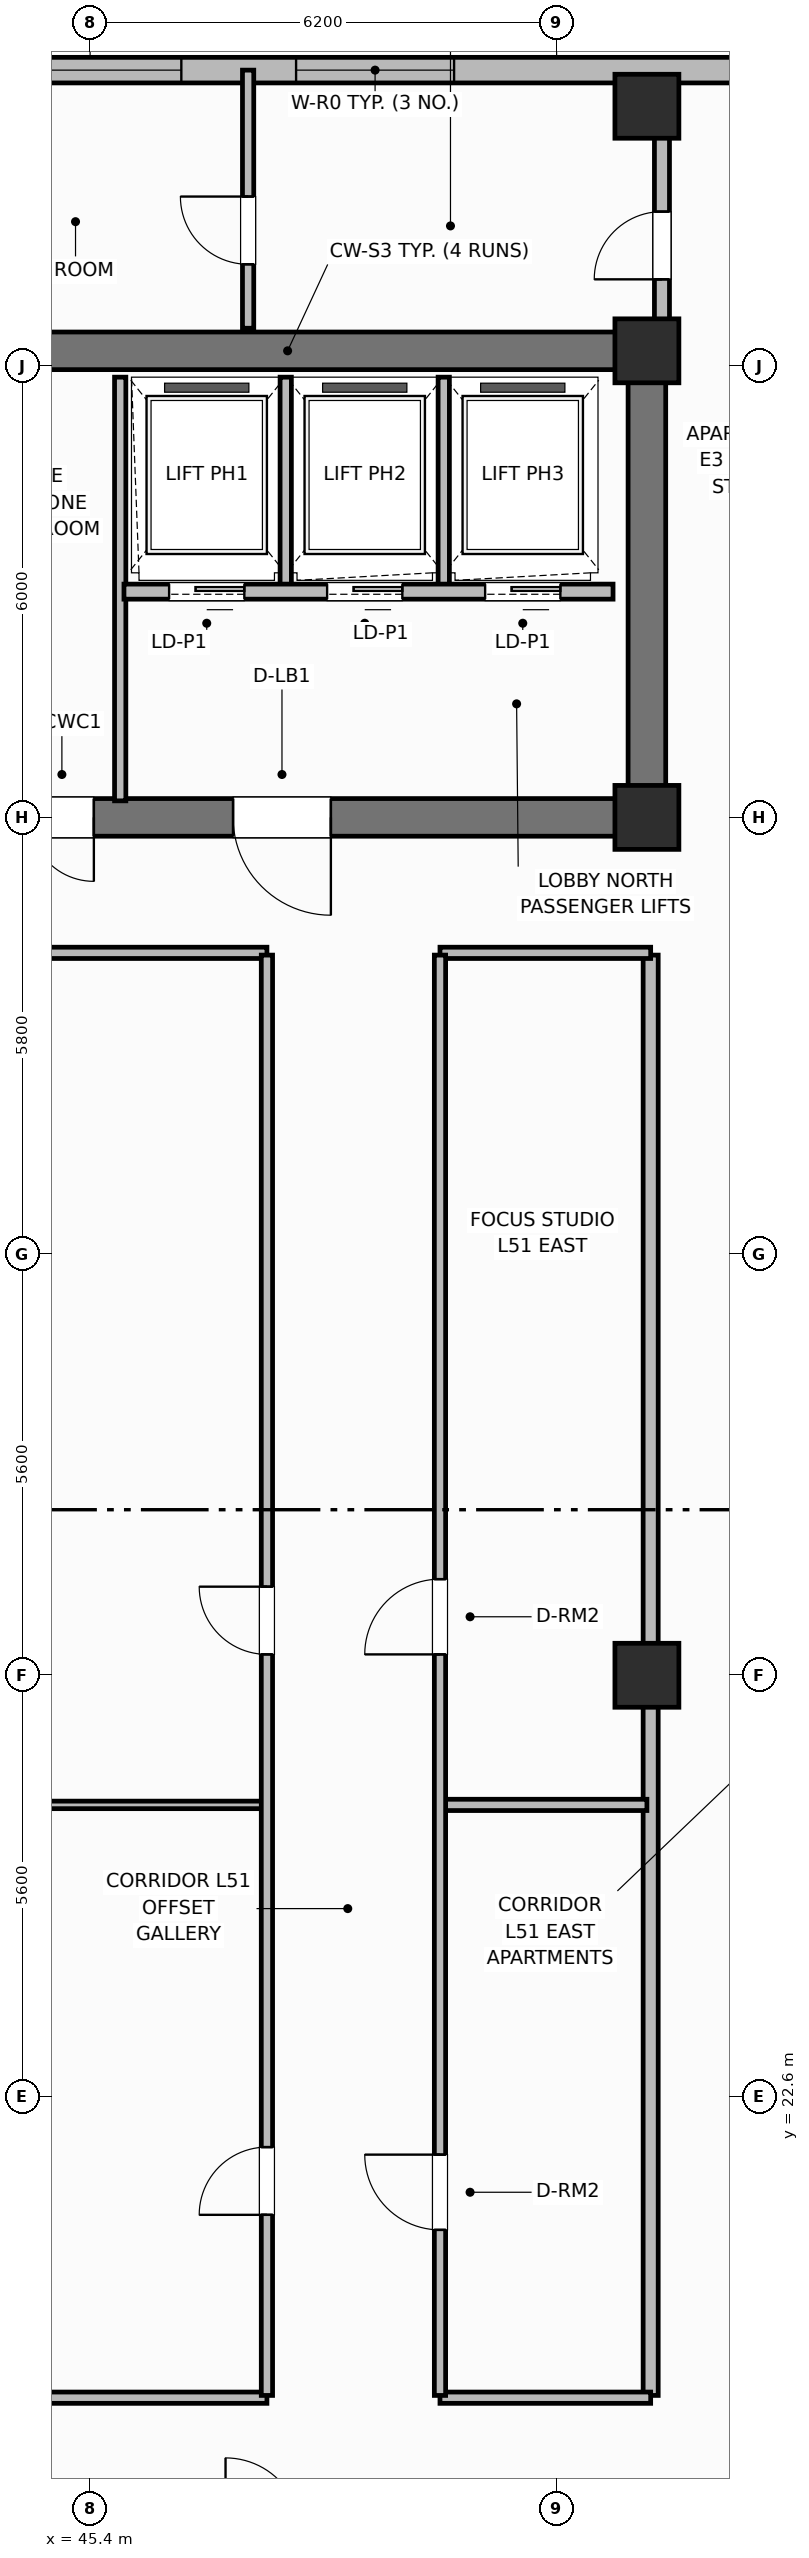
"""IFC4 building model, lengths in metres.
Left out: names, types, materials, properties, quantities, classifications, styles, units other than length and angle.
Written with IfcOpenShell. Run it as: python <this file> out.ifc"""

import sys

from ifc_helpers import new_model, si_unit, direction, frame, frame_2d, origin, origin_2d, place, context, subcontext, project, spatial, rectangle, extrude, element, fill, save


model = new_model("IFC4")
c1 = context("Model", 3, precision=1e-05, world=origin(), true_north=direction((0.0, 1.0)))
c2 = subcontext(c1, "Body", "Model", "MODEL_VIEW")
j1 = project(units=[si_unit("LENGTHUNIT", "METRE"), si_unit("PLANEANGLEUNIT", "RADIAN")], contexts=[c1])
p1 = place(None, origin())
s1 = spatial("IfcSite", under=j1, at=p1, CompositionType="ELEMENT")
p2 = place(p1, origin())
s2 = spatial("IfcBuilding", under=s1, at=p2, CompositionType="ELEMENT")
p3 = place(p2, frame((0.0, 0.0, 207.3)))
s3 = spatial("IfcBuildingStorey", under=s2, at=p3, CompositionType="ELEMENT", Elevation=207.3)
p4 = place(p3, frame((25.6, 45.8, 0.0), z_axis=(0.0, 0.0, 1.0), x_axis=(1.0, 0.0, 0.0)))
e1 = element("IfcWall", 1, at=p4, inside=s3, PredefinedType="SHEAR", context=c2, shape_type="SweptSolid", body=[
    extrude(rectangle(XDim=27.2, YDim=0.5, at=frame_2d((13.6, 0.0))), origin(), (0.0, 0.0, 1.0), 3.7),
])
p5 = place(p3, frame((52.8, 39.85, 0.0), z_axis=(0.0, 0.0, 1.0), x_axis=(0.0, 1.0, 0.0)))
e2 = element("IfcWall", 2, at=p5, inside=s3, PredefinedType="SHEAR", context=c2, shape_type="SweptSolid", body=[
    extrude(rectangle(XDim=5.7, YDim=0.5, at=frame_2d((2.85, 0.0))), origin(), (0.0, 0.0, 1.0), 3.7),
])
p6 = place(p3, frame((52.8, 39.6, 0.0), z_axis=(0.0, 0.0, 1.0), x_axis=(-1.0, 0.0, 0.0)))
e3 = element("IfcWall", 3, at=p6, inside=s3, PredefinedType="SHEAR", context=c2, shape_type="SweptSolid", body=[
    extrude(rectangle(XDim=27.2, YDim=0.5, at=frame_2d((13.6, 0.0))), origin(), (0.0, 0.0, 1.0), 3.7),
])
p7 = place(p6, frame((24.2, 0.0, 0.0)))
e4 = element("IfcOpeningElement", 4, at=p7, cuts=e3, PredefinedType="OPENING", context=c2, shape_type="SweptSolid", body=[
    extrude(rectangle(XDim=1.1, YDim=2.15, at=frame_2d((0.55, 1.075))), frame((0.0, 0.26, 0.0), z_axis=(0.0, -1.0, 0.0), x_axis=(1.0, 0.0, 0.0)), (0.0, 0.0, 1.0), 0.52),
])
p8 = place(p6, frame((15.1, 0.0, 0.0)))
e5 = element("IfcOpeningElement", 5, at=p8, cuts=e3, PredefinedType="OPENING", context=c2, shape_type="SweptSolid", body=[
    extrude(rectangle(XDim=1.2, YDim=2.15, at=frame_2d((0.6, 1.075))), frame((0.0, 0.26, 0.0), z_axis=(0.0, -1.0, 0.0), x_axis=(1.0, 0.0, 0.0)), (0.0, 0.0, 1.0), 0.52),
])
p9 = place(p6, frame((11.6, 0.0, 0.0)))
e6 = element("IfcOpeningElement", 6, at=p9, cuts=e3, PredefinedType="OPENING", context=c2, shape_type="SweptSolid", body=[
    extrude(rectangle(XDim=0.9, YDim=2.1, at=frame_2d((0.45, 1.05))), frame((0.0, 0.26, 0.0), z_axis=(0.0, -1.0, 0.0), x_axis=(1.0, 0.0, 0.0)), (0.0, 0.0, 1.0), 0.52),
])
p10 = place(p6, frame((7.35, 0.0, 0.0)))
e7 = element("IfcOpeningElement", 7, at=p10, cuts=e3, PredefinedType="OPENING", context=c2, shape_type="SweptSolid", body=[
    extrude(rectangle(XDim=0.85, YDim=2.1, at=frame_2d((0.425, 1.05))), frame((0.0, 0.26, 0.0), z_axis=(0.0, -1.0, 0.0), x_axis=(1.0, 0.0, 0.0)), (0.0, 0.0, 1.0), 0.52),
])
p11 = place(p6, frame((4.2, 0.0, 0.0)))
e8 = element("IfcOpeningElement", 8, at=p11, cuts=e3, PredefinedType="OPENING", context=c2, shape_type="SweptSolid", body=[
    extrude(rectangle(XDim=1.3, YDim=2.2, at=frame_2d((0.65, 1.1))), frame((0.0, 0.26, 0.0), z_axis=(0.0, -1.0, 0.0), x_axis=(1.0, 0.0, 0.0)), (0.0, 0.0, 1.0), 0.52),
])
for number, where, z_axis, x_axis in (
    (9, (52.8, 39.6, 0.0), (0.0, 0.0, 1.0), (1.0, 0.0, 0.0)),
    (10, (52.8, 45.8, 0.0), (0.0, 0.0, 1.0), (1.0, 0.0, 0.0)),
    (11, (52.8, 28.2, 0.0), (0.0, 0.0, 1.0), (1.0, 0.0, 0.0)),
    (12, (52.8, 49.05, 0.0), (0.0, 0.0, 1.0), (1.0, 0.0, 0.0)),
):
    element("IfcColumn", number, at=place(p3, frame(where, z_axis=z_axis, x_axis=x_axis)), inside=s3, PredefinedType="COLUMN", context=c2, shape_type="SweptSolid", body=[
        extrude(rectangle(XDim=0.85, YDim=0.85, at=origin_2d()), origin(), (0.0, 0.0, 1.0), 3.7),
    ])
p12 = place(p3, frame((58.2, 49.53, 0.0), z_axis=(0.0, 0.0, 1.0), x_axis=(-1.0, 0.0, 0.0)))
e13 = element("IfcWall", 13, at=p12, inside=s3, PredefinedType="SOLIDWALL", context=c2, shape_type="SweptSolid", body=[
    extrude(rectangle(XDim=15.8, YDim=0.34, at=frame_2d((7.9, 0.0))), origin(), (0.0, 0.0, 1.0), 2.72),
])
p13 = place(p12, frame((7.962, 0.0, 0.7)))
e14 = element("IfcOpeningElement", 14, at=p13, cuts=e13, PredefinedType="OPENING", context=c2, shape_type="SweptSolid", body=[
    extrude(rectangle(XDim=2.1, YDim=1.9, at=frame_2d((1.05, 0.95))), frame((0.0, 0.18, 0.0), z_axis=(0.0, -1.0, 0.0), x_axis=(1.0, 0.0, 0.0)), (0.0, 0.0, 1.0), 0.36),
])
p14 = place(p12, frame((11.587, 0.0, 0.7)))
e15 = element("IfcOpeningElement", 15, at=p14, cuts=e13, PredefinedType="OPENING", context=c2, shape_type="SweptSolid", body=[
    extrude(rectangle(XDim=2.1, YDim=1.9, at=frame_2d((1.05, 0.95))), frame((0.0, 0.18, 0.0), z_axis=(0.0, -1.0, 0.0), x_axis=(1.0, 0.0, 0.0)), (0.0, 0.0, 1.0), 0.36),
])
p15 = place(p3, frame((45.8, 39.82, 0.0), z_axis=(0.0, 0.0, 1.0), x_axis=(0.0, 1.0, 0.0)))
e16 = element("IfcWall", 16, at=p15, inside=s3, PredefinedType="PARTITIONING", context=c2, shape_type="SweptSolid", body=[
    extrude(rectangle(XDim=5.63, YDim=0.15, at=frame_2d((2.815, 0.0))), origin(), (0.0, 0.0, 1.0), 2.55),
])
for number, where, z_axis, x_axis in (
    (17, (48.0, 42.65, 0.0), (0.0, 0.0, 1.0), (0.0, 1.0, 0.0)),
    (18, (50.1, 42.65, 0.0), (0.0, 0.0, 1.0), (0.0, 1.0, 0.0)),
):
    element("IfcWall", number, at=place(p3, frame(where, z_axis=z_axis, x_axis=x_axis)), inside=s3, PredefinedType="PARTITIONING", context=c2, shape_type="SweptSolid", body=[
        extrude(rectangle(XDim=2.8, YDim=0.15, at=frame_2d((1.4, 0.0))), origin(), (0.0, 0.0, 1.0), 2.55),
    ])
p16 = place(p3, frame((52.35, 42.6, 0.0), z_axis=(0.0, 0.0, 1.0), x_axis=(-1.0, 0.0, 0.0)))
e19 = element("IfcWall", 19, at=p16, inside=s3, PredefinedType="PARTITIONING", context=c2, shape_type="SweptSolid", body=[
    extrude(rectangle(XDim=6.5, YDim=0.2, at=frame_2d((3.25, 0.0))), origin(), (0.0, 0.0, 1.0), 2.55),
])
p17 = place(p16, frame((4.9, 0.0, 0.0)))
e20 = element("IfcOpeningElement", 20, at=p17, cuts=e19, PredefinedType="OPENING", context=c2, shape_type="SweptSolid", body=[
    extrude(rectangle(XDim=1.0, YDim=2.15, at=frame_2d((0.5, 1.075))), frame((0.0, 0.11, 0.0), z_axis=(0.0, -1.0, 0.0), x_axis=(1.0, 0.0, 0.0)), (0.0, 0.0, 1.0), 0.22),
])
p18 = place(p16, frame((2.8, 0.0, 0.0)))
e21 = element("IfcOpeningElement", 21, at=p18, cuts=e19, PredefinedType="OPENING", context=c2, shape_type="SweptSolid", body=[
    extrude(rectangle(XDim=1.0, YDim=2.15, at=frame_2d((0.5, 1.075))), frame((0.0, 0.11, 0.0), z_axis=(0.0, -1.0, 0.0), x_axis=(1.0, 0.0, 0.0)), (0.0, 0.0, 1.0), 0.22),
])
p19 = place(p16, frame((0.7, 0.0, 0.0)))
e22 = element("IfcOpeningElement", 22, at=p19, cuts=e19, PredefinedType="OPENING", context=c2, shape_type="SweptSolid", body=[
    extrude(rectangle(XDim=1.0, YDim=2.15, at=frame_2d((0.5, 1.075))), frame((0.0, 0.11, 0.0), z_axis=(0.0, -1.0, 0.0), x_axis=(1.0, 0.0, 0.0)), (0.0, 0.0, 1.0), 0.22),
])
p20 = place(p3, frame((52.85, 18.63, 0.0), z_axis=(0.0, 0.0, 1.0), x_axis=(0.0, 1.0, 0.0)))
e23 = element("IfcWall", 23, at=p20, inside=s3, PredefinedType="PARTITIONING", context=c2, shape_type="SweptSolid", body=[
    extrude(rectangle(XDim=19.14, YDim=0.2, at=frame_2d((9.57, 0.0))), origin(), (0.0, 0.0, 1.0), 2.55),
])
p21 = place(p3, frame((25.55, 18.6, 0.0), z_axis=(0.0, 0.0, 1.0), x_axis=(1.0, 0.0, 0.0)))
e24 = element("IfcWall", 24, at=p21, inside=s3, PredefinedType="PARTITIONING", context=c2, shape_type="SweptSolid", body=[
    extrude(rectangle(XDim=22.2, YDim=0.15, at=frame_2d((11.1, 0.0))), origin(), (0.0, 0.0, 1.0), 2.55),
])
p22 = place(p3, frame((50.05, 18.6, 0.0), z_axis=(0.0, 0.0, 1.0), x_axis=(1.0, 0.0, 0.0)))
e25 = element("IfcWall", 25, at=p22, inside=s3, PredefinedType="PARTITIONING", context=c2, shape_type="SweptSolid", body=[
    extrude(rectangle(XDim=2.8, YDim=0.15, at=frame_2d((1.4, 0.0))), origin(), (0.0, 0.0, 1.0), 2.55),
])
p23 = place(p3, frame((25.55, 37.8, 0.0), z_axis=(0.0, 0.0, 1.0), x_axis=(1.0, 0.0, 0.0)))
e26 = element("IfcWall", 26, at=p23, inside=s3, PredefinedType="PARTITIONING", context=c2, shape_type="SweptSolid", body=[
    extrude(rectangle(XDim=22.2, YDim=0.15, at=frame_2d((11.1, 0.0))), origin(), (0.0, 0.0, 1.0), 2.55),
])
p24 = place(p3, frame((50.05, 37.8, 0.0), z_axis=(0.0, 0.0, 1.0), x_axis=(1.0, 0.0, 0.0)))
e27 = element("IfcWall", 27, at=p24, inside=s3, PredefinedType="PARTITIONING", context=c2, shape_type="SweptSolid", body=[
    extrude(rectangle(XDim=2.8, YDim=0.15, at=frame_2d((1.4, 0.0))), origin(), (0.0, 0.0, 1.0), 2.55),
])
p25 = place(p3, frame((34.95, 26.477, 0.0), z_axis=(0.0, 0.0, 1.0), x_axis=(1.0, 0.0, 0.0)))
e28 = element("IfcWall", 28, at=p25, inside=s3, PredefinedType="PARTITIONING", context=c2, shape_type="SweptSolid", body=[
    extrude(rectangle(XDim=12.81, YDim=0.1, at=frame_2d((6.405, 0.0))), origin(), (0.0, 0.0, 1.0), 2.55),
])
p26 = place(p3, frame((50.08, 26.477, 0.0), z_axis=(0.0, 0.0, 1.0), x_axis=(1.0, 0.0, 0.0)))
e29 = element("IfcWall", 29, at=p26, inside=s3, PredefinedType="PARTITIONING", context=c2, shape_type="SweptSolid", body=[
    extrude(rectangle(XDim=2.72, YDim=0.15, at=frame_2d((1.36, 0.0))), origin(), (0.0, 0.0, 1.0), 2.55),
])
p27 = place(p3, frame((47.75, 18.63, 0.0), z_axis=(0.0, 0.0, 1.0), x_axis=(0.0, 1.0, 0.0)))
e30 = element("IfcWall", 30, at=p27, inside=s3, PredefinedType="PARTITIONING", context=c2, shape_type="SweptSolid", body=[
    extrude(rectangle(XDim=19.14, YDim=0.15, at=frame_2d((9.57, 0.0))), origin(), (0.0, 0.0, 1.0), 2.55),
])
p28 = place(p27, frame((2.4, 0.0, 0.0)))
e31 = element("IfcOpeningElement", 31, at=p28, cuts=e30, PredefinedType="OPENING", context=c2, shape_type="SweptSolid", body=[
    extrude(rectangle(XDim=0.9, YDim=2.1, at=frame_2d((0.45, 1.05))), frame((0.0, 0.085, 0.0), z_axis=(0.0, -1.0, 0.0), x_axis=(1.0, 0.0, 0.0)), (0.0, 0.0, 1.0), 0.17),
])
p29 = place(p27, frame((9.847, 0.0, 0.0)))
e32 = element("IfcOpeningElement", 32, at=p29, cuts=e30, PredefinedType="OPENING", context=c2, shape_type="SweptSolid", body=[
    extrude(rectangle(XDim=0.9, YDim=2.1, at=frame_2d((0.45, 1.05))), frame((0.0, 0.085, 0.0), z_axis=(0.0, -1.0, 0.0), x_axis=(1.0, 0.0, 0.0)), (0.0, 0.0, 1.0), 0.17),
])
p30 = place(p3, frame((50.05, 18.63, 0.0), z_axis=(0.0, 0.0, 1.0), x_axis=(0.0, 1.0, 0.0)))
e33 = element("IfcWall", 33, at=p30, inside=s3, PredefinedType="PARTITIONING", context=c2, shape_type="SweptSolid", body=[
    extrude(rectangle(XDim=19.14, YDim=0.15, at=frame_2d((9.57, 0.0))), origin(), (0.0, 0.0, 1.0), 2.55),
])
p31 = place(p30, frame((2.2, 0.0, 0.0)))
e34 = element("IfcOpeningElement", 34, at=p31, cuts=e33, PredefinedType="OPENING", context=c2, shape_type="SweptSolid", body=[
    extrude(rectangle(XDim=1.0, YDim=2.15, at=frame_2d((0.5, 1.075))), frame((0.0, 0.085, 0.0), z_axis=(0.0, -1.0, 0.0), x_axis=(1.0, 0.0, 0.0)), (0.0, 0.0, 1.0), 0.17),
])
p32 = place(p30, frame((9.847, 0.0, 0.0)))
e35 = element("IfcOpeningElement", 35, at=p32, cuts=e33, PredefinedType="OPENING", context=c2, shape_type="SweptSolid", body=[
    extrude(rectangle(XDim=1.0, YDim=2.15, at=frame_2d((0.5, 1.075))), frame((0.0, 0.085, 0.0), z_axis=(0.0, -1.0, 0.0), x_axis=(1.0, 0.0, 0.0)), (0.0, 0.0, 1.0), 0.17),
])
p33 = place(p3, frame((47.5, 46.1, 0.0), z_axis=(0.0, 0.0, 1.0), x_axis=(0.0, 1.0, 0.0)))
e36 = element("IfcWall", 36, at=p33, inside=s3, PredefinedType="PARTITIONING", context=c2, shape_type="SweptSolid", body=[
    extrude(rectangle(XDim=3.43, YDim=0.15, at=frame_2d((1.715, 0.0))), origin(), (0.0, 0.0, 1.0), 2.55),
])
p34 = place(p33, frame((0.85, 0.0, 0.0)))
e37 = element("IfcOpeningElement", 37, at=p34, cuts=e36, PredefinedType="OPENING", context=c2, shape_type="SweptSolid", body=[
    extrude(rectangle(XDim=0.9, YDim=2.1, at=frame_2d((0.45, 1.05))), frame((0.0, 0.085, 0.0), z_axis=(0.0, -1.0, 0.0), x_axis=(1.0, 0.0, 0.0)), (0.0, 0.0, 1.0), 0.17),
])
p35 = place(p3, frame((53.0, 46.1, 0.0), z_axis=(0.0, 0.0, 1.0), x_axis=(0.0, 1.0, 0.0)))
e38 = element("IfcWall", 38, at=p35, inside=s3, PredefinedType="PARTITIONING", context=c2, shape_type="SweptSolid", body=[
    extrude(rectangle(XDim=2.73, YDim=0.2, at=frame_2d((1.365, 0.0))), origin(), (0.0, 0.0, 1.0), 2.55),
])
p36 = place(p35, frame((0.65, 0.0, 0.0)))
e39 = element("IfcOpeningElement", 39, at=p36, cuts=e38, PredefinedType="OPENING", context=c2, shape_type="SweptSolid", body=[
    extrude(rectangle(XDim=0.9, YDim=2.1, at=frame_2d((0.45, 1.05))), frame((0.0, 0.11, 0.0), z_axis=(0.0, -1.0, 0.0), x_axis=(1.0, 0.0, 0.0)), (0.0, 0.0, 1.0), 0.22),
])
p37 = place(p13, origin())
e40 = element("IfcWindow", 40, at=p37, inside=s3, PartitioningType="SINGLE_PANEL", PredefinedType="WINDOW", context=c2, shape_type="SweptSolid", body=[
    extrude(rectangle(XDim=2.1, YDim=1.9, at=frame_2d((1.05, 0.95))), frame((0.0, 0.03, 0.0), z_axis=(0.0, -1.0, 0.0), x_axis=(1.0, 0.0, 0.0)), (0.0, 0.0, 1.0), 0.06),
])
fill(e14, e40)
p38 = place(p14, origin())
e41 = element("IfcWindow", 41, at=p38, inside=s3, PartitioningType="SINGLE_PANEL", PredefinedType="WINDOW", context=c2, shape_type="SweptSolid", body=[
    extrude(rectangle(XDim=2.1, YDim=1.9, at=frame_2d((1.05, 0.95))), frame((0.0, 0.03, 0.0), z_axis=(0.0, -1.0, 0.0), x_axis=(1.0, 0.0, 0.0)), (0.0, 0.0, 1.0), 0.06),
])
fill(e15, e41)
p39 = place(p17, origin())
e42 = element("IfcDoor", 42, at=p39, inside=s3, OperationType="SLIDING_TO_LEFT", PredefinedType="DOOR", context=c2, shape_type="SweptSolid", body=[
    extrude(rectangle(XDim=1.0, YDim=2.15, at=frame_2d((0.5, 1.075))), frame((0.0, 0.025, 0.0), z_axis=(0.0, -1.0, 0.0), x_axis=(1.0, 0.0, 0.0)), (0.0, 0.0, 1.0), 0.05),
])
fill(e20, e42)
p40 = place(p18, origin())
e43 = element("IfcDoor", 43, at=p40, inside=s3, OperationType="SLIDING_TO_LEFT", PredefinedType="DOOR", context=c2, shape_type="SweptSolid", body=[
    extrude(rectangle(XDim=1.0, YDim=2.15, at=frame_2d((0.5, 1.075))), frame((0.0, 0.025, 0.0), z_axis=(0.0, -1.0, 0.0), x_axis=(1.0, 0.0, 0.0)), (0.0, 0.0, 1.0), 0.05),
])
fill(e21, e43)
p41 = place(p19, origin())
e44 = element("IfcDoor", 44, at=p41, inside=s3, OperationType="SLIDING_TO_LEFT", PredefinedType="DOOR", context=c2, shape_type="SweptSolid", body=[
    extrude(rectangle(XDim=1.0, YDim=2.15, at=frame_2d((0.5, 1.075))), frame((0.0, 0.025, 0.0), z_axis=(0.0, -1.0, 0.0), x_axis=(1.0, 0.0, 0.0)), (0.0, 0.0, 1.0), 0.05),
])
fill(e22, e44)
p42 = place(p28, origin())
e45 = element("IfcDoor", 45, at=p42, inside=s3, OperationType="SINGLE_SWING_LEFT", PredefinedType="DOOR", context=c2, shape_type="SweptSolid", body=[
    extrude(rectangle(XDim=0.9, YDim=2.1, at=frame_2d((0.45, 1.05))), frame((0.0, 0.025, 0.0), z_axis=(0.0, -1.0, 0.0), x_axis=(1.0, 0.0, 0.0)), (0.0, 0.0, 1.0), 0.05),
])
fill(e31, e45)
p43 = place(p29, origin())
e46 = element("IfcDoor", 46, at=p43, inside=s3, OperationType="SINGLE_SWING_RIGHT", PredefinedType="DOOR", context=c2, shape_type="SweptSolid", body=[
    extrude(rectangle(XDim=0.9, YDim=2.1, at=frame_2d((0.45, 1.05))), frame((0.0, 0.025, 0.0), z_axis=(0.0, -1.0, 0.0), x_axis=(1.0, 0.0, 0.0)), (0.0, 0.0, 1.0), 0.05),
])
fill(e32, e46)
p44 = place(p31, origin())
e47 = element("IfcDoor", 47, at=p44, inside=s3, OperationType="SINGLE_SWING_RIGHT", PredefinedType="DOOR", context=c2, shape_type="SweptSolid", body=[
    extrude(rectangle(XDim=1.0, YDim=2.15, at=frame_2d((0.5, 1.075))), frame((0.0, 0.025, 0.0), z_axis=(0.0, -1.0, 0.0), x_axis=(1.0, 0.0, 0.0)), (0.0, 0.0, 1.0), 0.05),
])
fill(e34, e47)
p45 = place(p32, origin())
e48 = element("IfcDoor", 48, at=p45, inside=s3, OperationType="SINGLE_SWING_LEFT", PredefinedType="DOOR", context=c2, shape_type="SweptSolid", body=[
    extrude(rectangle(XDim=1.0, YDim=2.15, at=frame_2d((0.5, 1.075))), frame((0.0, 0.025, 0.0), z_axis=(0.0, -1.0, 0.0), x_axis=(1.0, 0.0, 0.0)), (0.0, 0.0, 1.0), 0.05),
])
fill(e35, e48)
p46 = place(p34, origin())
e49 = element("IfcDoor", 49, at=p46, inside=s3, OperationType="SINGLE_SWING_RIGHT", PredefinedType="DOOR", context=c2, shape_type="SweptSolid", body=[
    extrude(rectangle(XDim=0.9, YDim=2.1, at=frame_2d((0.45, 1.05))), frame((0.0, 0.025, 0.0), z_axis=(0.0, -1.0, 0.0), x_axis=(1.0, 0.0, 0.0)), (0.0, 0.0, 1.0), 0.05),
])
fill(e37, e49)
p47 = place(p36, origin())
e50 = element("IfcDoor", 50, at=p47, inside=s3, OperationType="SINGLE_SWING_LEFT", PredefinedType="DOOR", context=c2, shape_type="SweptSolid", body=[
    extrude(rectangle(XDim=0.9, YDim=2.1, at=frame_2d((0.45, 1.05))), frame((0.0, 0.025, 0.0), z_axis=(0.0, -1.0, 0.0), x_axis=(1.0, 0.0, 0.0)), (0.0, 0.0, 1.0), 0.05),
])
fill(e39, e50)
p48 = place(p10, origin())
e51 = element("IfcDoor", 51, at=p48, inside=s3, OperationType="SINGLE_SWING_LEFT", PredefinedType="DOOR", context=c2, shape_type="SweptSolid", body=[
    extrude(rectangle(XDim=0.85, YDim=2.1, at=frame_2d((0.425, 1.05))), frame((0.0, 0.025, 0.0), z_axis=(0.0, -1.0, 0.0), x_axis=(1.0, 0.0, 0.0)), (0.0, 0.0, 1.0), 0.05),
])
fill(e7, e51)
p49 = place(p11, origin())
e52 = element("IfcDoor", 52, at=p49, inside=s3, OperationType="SINGLE_SWING_LEFT", PredefinedType="DOOR", context=c2, shape_type="SweptSolid", body=[
    extrude(rectangle(XDim=1.3, YDim=2.2, at=frame_2d((0.65, 1.1))), frame((0.0, 0.025, 0.0), z_axis=(0.0, -1.0, 0.0), x_axis=(1.0, 0.0, 0.0)), (0.0, 0.0, 1.0), 0.05),
])
fill(e8, e52)
save(model, sys.argv[1])
